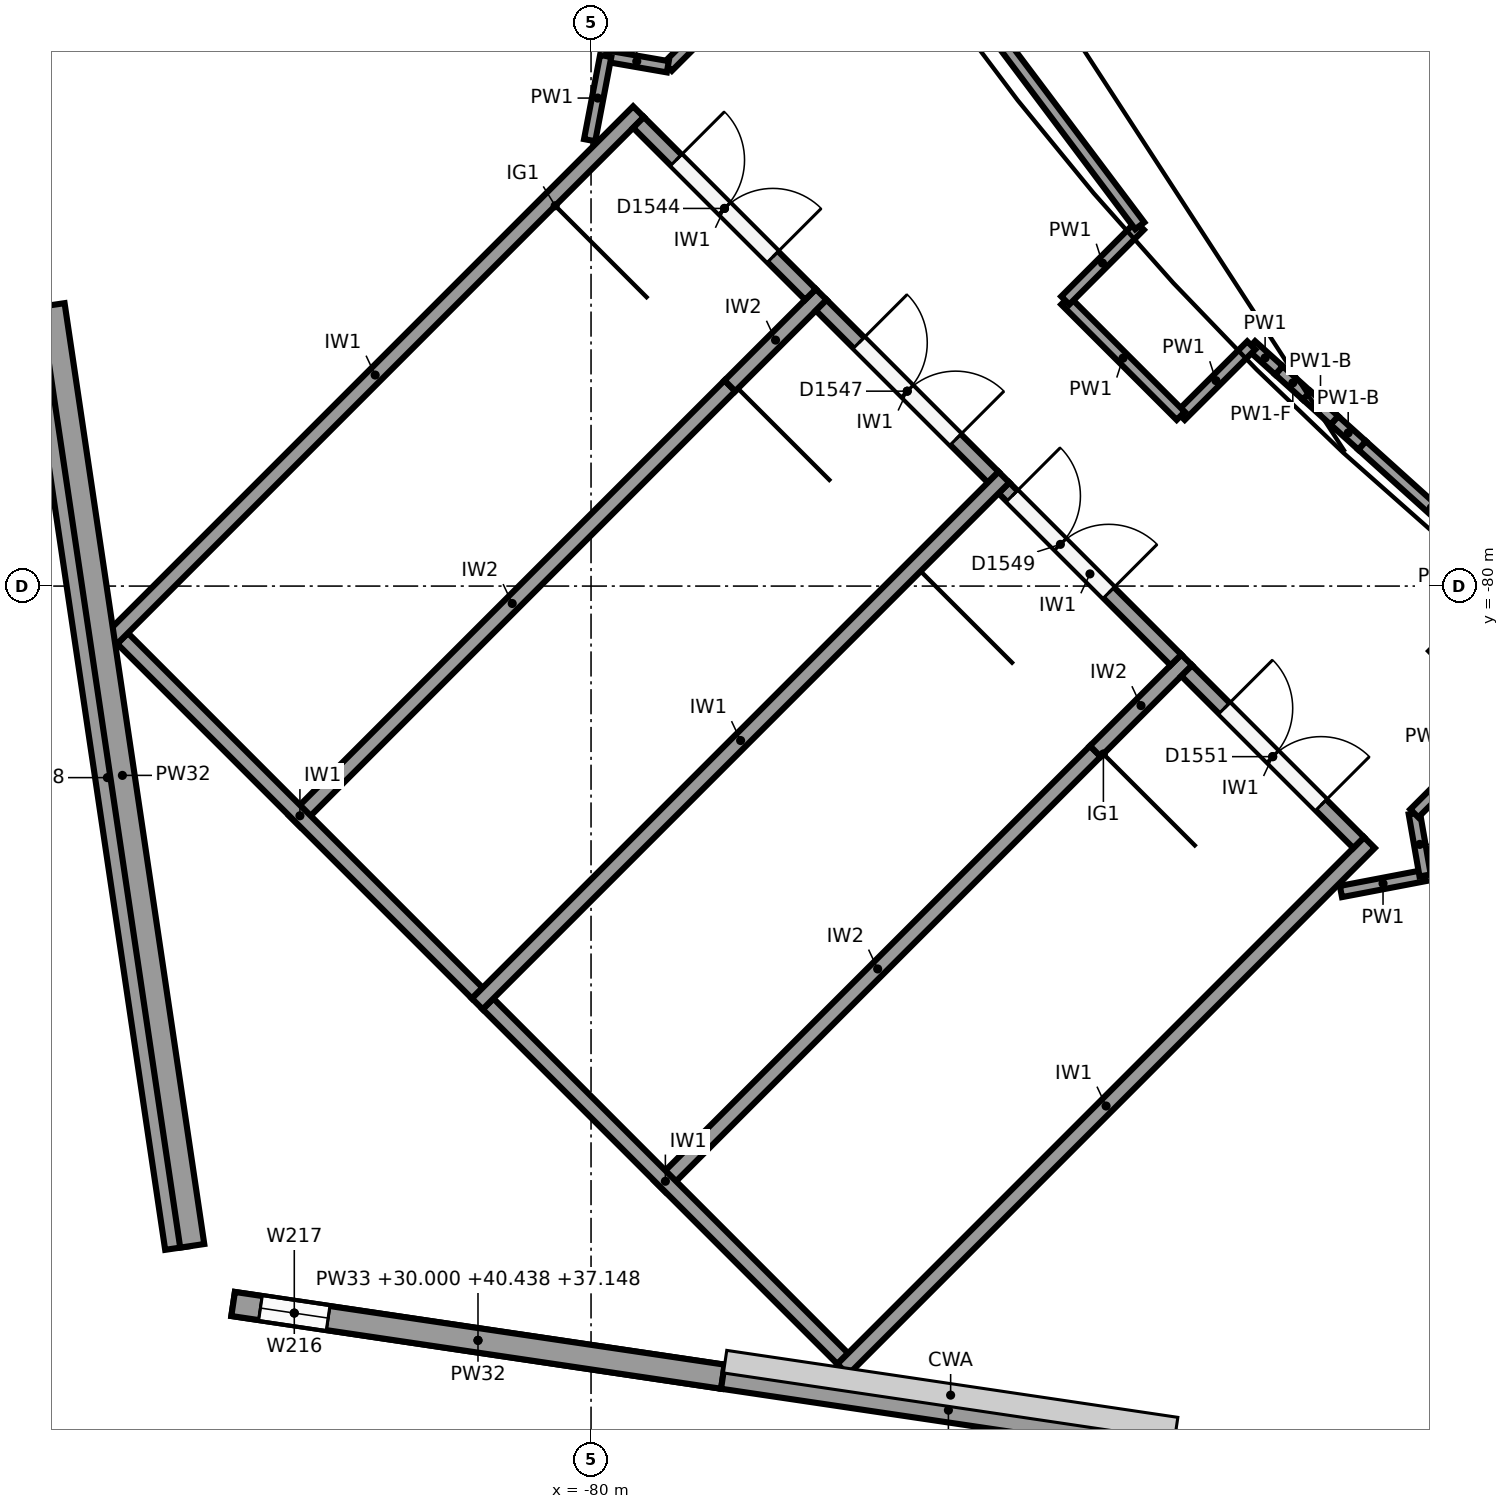
"""IFC4 building model, lengths in metres.
Left out: names, types, materials, properties, quantities, classifications, styles, units other than length and angle.
Written with IfcOpenShell. Run it as: python <this file> out.ifc"""

import sys

from ifc_helpers import new_model, si_unit, direction, frame, frame_2d, origin, origin_2d, place, context, subcontext, project, spatial, polyline, rectangle, circle, outline, extrude, element, fill, save


model = new_model("IFC4")
c1 = context("Model", 3, precision=1e-05, world=origin(), true_north=direction((0.0, 1.0)))
c2 = subcontext(c1, "Body", "Model", "MODEL_VIEW")
j1 = project(units=[si_unit("LENGTHUNIT", "METRE"), si_unit("PLANEANGLEUNIT", "RADIAN")], contexts=[c1])
p1 = place(None, origin())
s1 = spatial("IfcSite", under=j1, at=p1, CompositionType="ELEMENT")
p2 = place(p1, origin())
s2 = spatial("IfcBuilding", under=s1, at=p2, CompositionType="ELEMENT")
p3 = place(p2, frame((0.0, 0.0, 24.0)))
s3 = spatial("IfcBuildingStorey", under=s2, at=p3, CompositionType="ELEMENT", Elevation=24.0)
p4 = place(p3, frame((-87.151, -75.857, 0.0), z_axis=(0.0, 0.0, 1.0), x_axis=(1.0, 0.0, 0.0)))
e1 = element("IfcColumn", 1, at=p4, inside=s3, PredefinedType="COLUMN", context=c2, shape_type="SweptSolid", body=[
    extrude(circle(Radius=0.45, at=origin_2d()), origin(), (0.0, 0.0, 1.0), 6.0),
])
p5 = place(p3, frame((-71.775, -79.889, 0.0), z_axis=(0.0, 0.0, 1.0), x_axis=(1.0, 0.0, 0.0)))
e2 = element("IfcColumn", 2, at=p5, inside=s3, PredefinedType="COLUMN", context=c2, shape_type="SweptSolid", body=[
    extrude(circle(Radius=0.6, at=origin_2d()), origin(), (0.0, 0.0, 1.0), 6.0),
])
p6 = place(p3, frame((-85.174, -89.174, 0.0), z_axis=(0.0, 0.0, 1.0), x_axis=(1.0, 0.0, 0.0)))
e3 = element("IfcColumn", 3, at=p6, inside=s3, PredefinedType="COLUMN", context=c2, shape_type="SweptSolid", body=[
    extrude(circle(Radius=0.5, at=origin_2d()), origin(), (0.0, 0.0, 1.0), 6.0),
])
p7 = place(p3, frame((-71.857, -91.151, 0.0), z_axis=(0.0, 0.0, 1.0), x_axis=(1.0, 0.0, 0.0)))
e4 = element("IfcColumn", 4, at=p7, inside=s3, PredefinedType="COLUMN", context=c2, shape_type="SweptSolid", body=[
    extrude(circle(Radius=0.45, at=origin_2d()), origin(), (0.0, 0.0, 1.0), 6.0),
])
p8 = place(p3, frame((-85.247, -88.68, 0.0), z_axis=(0.0, 0.0, 1.0), x_axis=(-0.14684632149, 0.989159318747, 0.0)))
e5 = element("IfcWall", 5, at=p8, inside=s3, PredefinedType="SOLIDWALL", context=c2, shape_type="SweptSolid", body=[
    extrude(rectangle(XDim=12.514, YDim=0.32, at=frame_2d((6.257, 0.0))), origin(), (0.0, 0.0, 1.0), 6.0),
])
p9 = place(p3, frame((-85.445, -88.709, 6.0), z_axis=(0.0, 0.0, 1.0), x_axis=(-0.146868244204, 0.989156063948, 0.0)))
e6 = element("IfcWall", 6, at=p9, inside=s3, PredefinedType="SOLIDWALL", context=c2, shape_type="SweptSolid", body=[
    extrude(outline(polyline([(0.0, 0.0), (12.514, 0.0), (12.514, 4.117), (0.0, 10.438), (0.0, 0.0)])), frame((0.0, 0.16, 0.0), z_axis=(0.0, -1.0, 0.0), x_axis=(1.0, 0.0, 0.0)), (0.0, 0.0, 1.0), 0.32),
])
p10 = place(p3, frame((-78.266, -90.402, 0.0), z_axis=(0.0, 0.0, 1.0), x_axis=(-0.989154104726, 0.146881438937, 0.0)))
e7 = element("IfcWall", 7, at=p10, inside=s3, PredefinedType="SOLIDWALL", context=c2, shape_type="SweptSolid", body=[
    extrude(rectangle(XDim=6.514, YDim=0.32, at=frame_2d((3.257, 0.0))), origin(), (0.0, 0.0, 1.0), 6.0),
])
p11 = place(p10, frame((5.25, 0.0, 1.0)))
e8 = element("IfcOpeningElement", 8, at=p11, cuts=e7, PredefinedType="OPENING", context=c2, shape_type="SweptSolid", body=[
    extrude(rectangle(XDim=0.9, YDim=3.25, at=frame_2d((0.45, 1.625))), frame((0.0, 0.17, 0.0), z_axis=(0.0, -1.0, 0.0), x_axis=(1.0, 0.0, 0.0)), (0.0, 0.0, 1.0), 0.34),
])
p12 = place(p3, frame((-78.266, -90.402, 6.0), z_axis=(0.0, 0.0, 1.0), x_axis=(-0.989154104726, 0.146881438937, 0.0)))
e9 = element("IfcWall", 9, at=p12, inside=s3, PredefinedType="SOLIDWALL", context=c2, shape_type="SweptSolid", body=[
    extrude(outline(polyline([(0.0, 0.0), (6.514, 0.0), (6.514, 10.438), (0.0, 7.147), (0.0, 0.0)])), frame((0.0, 0.16, 0.0), z_axis=(0.0, -1.0, 0.0), x_axis=(1.0, 0.0, 0.0)), (0.0, 0.0, 1.0), 0.32),
])
p13 = place(p12, frame((5.25, 0.0, 1.6)))
e10 = element("IfcOpeningElement", 10, at=p13, cuts=e9, PredefinedType="OPENING", context=c2, shape_type="SweptSolid", body=[
    extrude(rectangle(XDim=0.9, YDim=3.0, at=frame_2d((0.45, 1.5))), frame((0.0, 0.17, 0.0), z_axis=(0.0, -1.0, 0.0), x_axis=(1.0, 0.0, 0.0)), (0.0, 0.0, 1.0), 0.34),
])
p14 = place(p3, frame((-72.331, -91.283, 5.65), z_axis=(0.0, 0.0, 1.0), x_axis=(-0.989158190862, 0.146853918747, 0.0)))
e11 = element("IfcWall", 11, at=p14, inside=s3, PredefinedType="SOLIDWALL", context=c2, shape_type="SweptSolid", body=[
    extrude(outline(polyline([(0.0, 0.0), (6.0, 0.0), (6.0, 7.498), (0.0, 4.467), (0.0, 0.0)])), frame((0.0, 0.16, 0.0), z_axis=(0.0, -1.0, 0.0), x_axis=(1.0, 0.0, 0.0)), (0.0, 0.0, 1.0), 0.32),
])
p15 = place(p3, frame((-91.137, -72.998, 0.0), z_axis=(0.0, 0.0, 1.0), x_axis=(0.943887243331, 0.330267878966, 0.0)))
e12 = element("IfcWall", 12, at=p15, inside=s3, PredefinedType="SHEAR", context=c2, shape_type="SweptSolid", body=[
    extrude(rectangle(XDim=8.3, YDim=0.2, at=frame_2d((4.15, 0.0))), origin(), (0.0, 0.0, 1.0), 5.75),
])
for number, where, z_axis, x_axis in (
    (13, (-86.305, -80.688, 0.0), (0.0, 0.0, 1.0), (0.707, 0.707, 0.0)),
    (14, (-81.497, -85.497, 0.0), (0.0, 0.0, 1.0), (0.707, 0.707, 0.0)),
    (15, (-76.688, -90.305, 0.0), (0.0, 0.0, 1.0), (0.707, 0.707, 0.0)),
):
    element("IfcWall", number, at=place(p3, frame(where, z_axis=z_axis, x_axis=x_axis)), inside=s3, PredefinedType="SHEAR", context=c2, shape_type="SweptSolid", body=[
        extrude(rectangle(XDim=9.8, YDim=0.2, at=frame_2d((4.9, 0.0))), origin(), (0.0, 0.0, 1.0), 5.75),
    ])
for number, where, z_axis, x_axis in (
    (16, (-86.164, -80.688, 0.0), (0.0, 0.0, 1.0), (0.707, -0.707, 0.0)),
    (17, (-81.355, -85.497, 0.0), (0.0, 0.0, 1.0), (0.707, -0.707, 0.0)),
):
    element("IfcWall", number, at=place(p3, frame(where, z_axis=z_axis, x_axis=x_axis)), inside=s3, PredefinedType="SHEAR", context=c2, shape_type="SweptSolid", body=[
        extrude(rectangle(XDim=6.6, YDim=0.2, at=frame_2d((3.3, 0.0))), origin(), (0.0, 0.0, 1.0), 5.75),
    ])
p16 = place(p3, frame((-83.901, -83.093, 0.0), z_axis=(0.0, 0.0, 1.0), x_axis=(0.707106781187, 0.707106781187, 0.0)))
e18 = element("IfcWall", 18, at=p16, inside=s3, PredefinedType="SHEAR", context=c2, shape_type="SweptSolid", body=[
    extrude(rectangle(XDim=8.1, YDim=0.2, at=frame_2d((4.05, 0.0))), origin(), (0.0, 0.0, 1.0), 5.75),
])
p17 = place(p3, frame((-78.173, -77.365, 0.0), z_axis=(0.0, 0.0, 1.0), x_axis=(0.707178586901, 0.707034968179, 0.0)))
e19 = element("IfcWall", 19, at=p17, inside=s3, PredefinedType="SHEAR", context=c2, shape_type="SweptSolid", body=[
    extrude(rectangle(XDim=1.7, YDim=0.2, at=frame_2d((0.85, 0.0))), origin(), (0.0, 0.0, 1.0), 5.75),
])
p18 = place(p3, frame((-79.093, -87.901, 0.0), z_axis=(0.0, 0.0, 1.0), x_axis=(0.707106781187, 0.707106781187, 0.0)))
e20 = element("IfcWall", 20, at=p18, inside=s3, PredefinedType="SHEAR", context=c2, shape_type="SweptSolid", body=[
    extrude(rectangle(XDim=8.1, YDim=0.2, at=frame_2d((4.05, 0.0))), origin(), (0.0, 0.0, 1.0), 5.75),
])
p19 = place(p3, frame((-73.365, -82.173, 0.0), z_axis=(0.0, 0.0, 1.0), x_axis=(0.707034968179, 0.707178586901, 0.0)))
e21 = element("IfcWall", 21, at=p19, inside=s3, PredefinedType="SHEAR", context=c2, shape_type="SweptSolid", body=[
    extrude(rectangle(XDim=1.7, YDim=0.2, at=frame_2d((0.85, 0.0))), origin(), (0.0, 0.0, 1.0), 5.75),
])
p20 = place(p3, frame((-79.375, -73.9, 0.0), z_axis=(0.0, 0.0, 1.0), x_axis=(0.707068634461, -0.707144925854, 0.0)))
e22 = element("IfcWall", 22, at=p20, inside=s3, PredefinedType="SHEAR", context=c2, shape_type="SweptSolid", body=[
    extrude(rectangle(XDim=3.2, YDim=0.2, at=frame_2d((1.6, 0.0))), origin(), (0.0, 0.0, 1.0), 5.75),
])
p21 = place(p20, frame((0.7, 0.0, 0.0)))
e23 = element("IfcOpeningElement", 23, at=p21, cuts=e22, PredefinedType="OPENING", context=c2, shape_type="SweptSolid", body=[
    extrude(rectangle(XDim=1.8, YDim=2.1, at=frame_2d((0.9, 1.05))), frame((0.0, 0.11, 0.0), z_axis=(0.0, -1.0, 0.0), x_axis=(1.0, 0.0, 0.0)), (0.0, 0.0, 1.0), 0.22),
])
p22 = place(p3, frame((-76.971, -76.304, 0.0), z_axis=(0.0, 0.0, 1.0), x_axis=(0.707106781187, -0.707106781187, 0.0)))
e24 = element("IfcWall", 24, at=p22, inside=s3, PredefinedType="SHEAR", context=c2, shape_type="SweptSolid", body=[
    extrude(rectangle(XDim=3.2, YDim=0.2, at=frame_2d((1.6, 0.0))), origin(), (0.0, 0.0, 1.0), 5.75),
])
p23 = place(p22, frame((0.7, 0.0, 0.0)))
e25 = element("IfcOpeningElement", 25, at=p23, cuts=e24, PredefinedType="OPENING", context=c2, shape_type="SweptSolid", body=[
    extrude(rectangle(XDim=1.8, YDim=2.1, at=frame_2d((0.9, 1.05))), frame((0.0, 0.11, 0.0), z_axis=(0.0, -1.0, 0.0), x_axis=(1.0, 0.0, 0.0)), (0.0, 0.0, 1.0), 0.22),
])
p24 = place(p3, frame((-74.567, -78.708, 0.0), z_axis=(0.0, 0.0, 1.0), x_axis=(0.707106781187, -0.707106781187, 0.0)))
e26 = element("IfcWall", 26, at=p24, inside=s3, PredefinedType="SHEAR", context=c2, shape_type="SweptSolid", body=[
    extrude(rectangle(XDim=3.2, YDim=0.2, at=frame_2d((1.6, 0.0))), origin(), (0.0, 0.0, 1.0), 5.75),
])
p25 = place(p24, frame((0.15, 0.0, 0.0)))
e27 = element("IfcOpeningElement", 27, at=p25, cuts=e26, PredefinedType="OPENING", context=c2, shape_type="SweptSolid", body=[
    extrude(rectangle(XDim=1.8, YDim=2.1, at=frame_2d((0.9, 1.05))), frame((0.0, 0.11, 0.0), z_axis=(0.0, -1.0, 0.0), x_axis=(1.0, 0.0, 0.0)), (0.0, 0.0, 1.0), 0.22),
])
p26 = place(p3, frame((-72.163, -81.113, 0.0), z_axis=(0.0, 0.0, 1.0), x_axis=(0.707144925854, -0.707068634461, 0.0)))
e28 = element("IfcWall", 28, at=p26, inside=s3, PredefinedType="SHEAR", context=c2, shape_type="SweptSolid", body=[
    extrude(rectangle(XDim=3.2, YDim=0.2, at=frame_2d((1.6, 0.0))), origin(), (0.0, 0.0, 1.0), 5.75),
])
p27 = place(p26, frame((0.7, 0.0, 0.0)))
e29 = element("IfcOpeningElement", 29, at=p27, cuts=e28, PredefinedType="OPENING", context=c2, shape_type="SweptSolid", body=[
    extrude(rectangle(XDim=1.8, YDim=2.1, at=frame_2d((0.9, 1.05))), frame((0.0, 0.11, 0.0), z_axis=(0.0, -1.0, 0.0), x_axis=(1.0, 0.0, 0.0)), (0.0, 0.0, 1.0), 0.22),
])
p28 = place(p3, frame((-68.998, -95.137, 0.0), z_axis=(0.0, 0.0, 1.0), x_axis=(0.330263153216, 0.943888896866, 0.0)))
e30 = element("IfcWall", 30, at=p28, inside=s3, PredefinedType="SHEAR", context=c2, shape_type="SweptSolid", body=[
    extrude(rectangle(XDim=8.1, YDim=0.2, at=frame_2d((4.05, 0.0))), origin(), (0.0, 0.0, 1.0), 5.75),
])
p29 = place(p3, frame((-70.134, -84.018, 0.0), z_axis=(0.0, 0.0, 1.0), x_axis=(0.982266484486, 0.187490142289, 0.0)))
e31 = element("IfcWall", 31, at=p29, inside=s3, PredefinedType="PARTITIONING", context=c2, shape_type="SweptSolid", body=[
    extrude(rectangle(XDim=1.128, YDim=0.15, at=frame_2d((0.564, 0.0))), origin(), (0.0, 0.0, 1.0), 5.4),
])
p30 = place(p3, frame((-69.026, -83.807, 0.0), z_axis=(0.0, 0.0, 1.0), x_axis=(-0.171316329805, 0.985216075357, 0.0)))
e32 = element("IfcWall", 32, at=p30, inside=s3, PredefinedType="PARTITIONING", context=c2, shape_type="SweptSolid", body=[
    extrude(rectangle(XDim=0.829, YDim=0.15, at=frame_2d((0.415, 0.0))), origin(), (0.0, 0.0, 1.0), 5.4),
])
p31 = place(p3, frame((-69.168, -82.99, 0.0), z_axis=(0.0, 0.0, 1.0), x_axis=(0.707106781187, 0.707106781187, 0.0)))
e33 = element("IfcWall", 33, at=p31, inside=s3, PredefinedType="PARTITIONING", context=c2, shape_type="SweptSolid", body=[
    extrude(rectangle(XDim=1.643, YDim=0.15, at=frame_2d((0.822, 0.0))), origin(), (0.0, 0.0, 1.0), 5.4),
])
p32 = place(p3, frame((-68.034, -79.792, 0.0), z_axis=(0.0, 0.0, 1.0), x_axis=(-0.742586219179, 0.669750481213, 0.0)))
e34 = element("IfcWall", 34, at=p32, inside=s3, PredefinedType="PARTITIONING", context=c2, shape_type="SweptSolid", body=[
    extrude(rectangle(XDim=2.454, YDim=0.15, at=frame_2d((1.227, 0.0))), origin(), (0.0, 0.0, 1.0), 5.4),
])
p33 = place(p3, frame((-69.856, -78.149, 0.0), z_axis=(0.0, 0.0, 1.0), x_axis=(-0.742477572111, 0.669870924068, 0.0)))
e35 = element("IfcWall", 35, at=p33, inside=s3, PredefinedType="PARTITIONING", context=c2, shape_type="SweptSolid", body=[
    extrude(rectangle(XDim=0.491, YDim=0.15, at=frame_2d((0.246, 0.0))), origin(), (0.0, 0.0, 1.0), 2.379),
])
p34 = place(p3, frame((-70.22, -77.82, 0.0), z_axis=(0.0, 0.0, 1.0), x_axis=(-0.742724945946, 0.669596635796, 0.0)))
e36 = element("IfcWall", 36, at=p34, inside=s3, PredefinedType="PARTITIONING", context=c2, shape_type="SweptSolid", body=[
    extrude(rectangle(XDim=0.491, YDim=0.15, at=frame_2d((0.245, 0.0))), origin(), (0.0, 0.0, 1.0), 2.379),
])
p35 = place(p3, frame((-70.585, -77.491, 0.0), z_axis=(0.0, 0.0, 1.0), x_axis=(-0.742254293896, 0.670118320293, 0.0)))
e37 = element("IfcWall", 37, at=p35, inside=s3, PredefinedType="PARTITIONING", context=c2, shape_type="SweptSolid", body=[
    extrude(rectangle(XDim=0.491, YDim=0.15, at=frame_2d((0.245, 0.0))), origin(), (0.0, 0.0, 1.0), 2.474),
])
p36 = place(p3, frame((-70.949, -77.162, 0.0), z_axis=(0.0, 0.0, 1.0), x_axis=(-0.742724945946, 0.669596635796, 0.0)))
e38 = element("IfcWall", 38, at=p36, inside=s3, PredefinedType="PARTITIONING", context=c2, shape_type="SweptSolid", body=[
    extrude(rectangle(XDim=0.491, YDim=0.15, at=frame_2d((0.245, 0.0))), origin(), (0.0, 0.0, 1.0), 5.4),
])
p37 = place(p3, frame((-71.313, -76.834, 0.0), z_axis=(0.0, 0.0, 1.0), x_axis=(-0.707664949678, -0.706548171746, 0.0)))
e39 = element("IfcWall", 39, at=p37, inside=s3, PredefinedType="PARTITIONING", context=c2, shape_type="SweptSolid", body=[
    extrude(rectangle(XDim=1.312, YDim=0.15, at=frame_2d((0.656, 0.0))), origin(), (0.0, 0.0, 1.0), 5.4),
])
p38 = place(p3, frame((-72.242, -77.76, 0.0), z_axis=(0.0, 0.0, 1.0), x_axis=(-0.707163624852, 0.707049932951, 0.0)))
e40 = element("IfcWall", 40, at=p38, inside=s3, PredefinedType="PARTITIONING", context=c2, shape_type="SweptSolid", body=[
    extrude(rectangle(XDim=2.147, YDim=0.15, at=frame_2d((1.074, 0.0))), origin(), (0.0, 0.0, 1.0), 5.4),
])
p39 = place(p3, frame((-73.76, -76.242, 0.0), z_axis=(0.0, 0.0, 1.0), x_axis=(0.706226529773, 0.707985938168, 0.0)))
e41 = element("IfcWall", 41, at=p39, inside=s3, PredefinedType="PARTITIONING", context=c2, shape_type="SweptSolid", body=[
    extrude(rectangle(XDim=1.388, YDim=0.15, at=frame_2d((0.694, 0.0))), origin(), (0.0, 0.0, 1.0), 5.4),
])
p40 = place(p3, frame((-72.78, -75.26, 0.0), z_axis=(0.0, 0.0, 1.0), x_axis=(-0.600540118693, 0.799594625945, 0.0)))
e42 = element("IfcWall", 42, at=p40, inside=s3, PredefinedType="PARTITIONING", context=c2, shape_type="SweptSolid", body=[
    extrude(rectangle(XDim=5.929, YDim=0.15, at=frame_2d((2.964, 0.0))), origin(), (0.0, 0.0, 1.0), 5.4),
])
p41 = place(p3, frame((-78.091, -72.269, 0.0), z_axis=(0.0, 0.0, 1.0), x_axis=(-0.707106781187, -0.707106781187, 0.0)))
e43 = element("IfcWall", 43, at=p41, inside=s3, PredefinedType="PARTITIONING", context=c2, shape_type="SweptSolid", body=[
    extrude(rectangle(XDim=1.272, YDim=0.15, at=frame_2d((0.636, 0.0))), origin(), (0.0, 0.0, 1.0), 5.4),
])
p42 = place(p3, frame((-78.99, -73.168, 0.0), z_axis=(0.0, 0.0, 1.0), x_axis=(-0.985216075357, 0.171316329805, 0.0)))
e44 = element("IfcWall", 44, at=p42, inside=s3, PredefinedType="PARTITIONING", context=c2, shape_type="SweptSolid", body=[
    extrude(rectangle(XDim=0.829, YDim=0.15, at=frame_2d((0.415, 0.0))), origin(), (0.0, 0.0, 1.0), 5.4),
])
p43 = place(p3, frame((-79.807, -73.026, 0.0), z_axis=(0.0, 0.0, 1.0), x_axis=(-0.187490142289, -0.982266484486, 0.0)))
e45 = element("IfcWall", 45, at=p43, inside=s3, PredefinedType="PARTITIONING", context=c2, shape_type="SweptSolid", body=[
    extrude(rectangle(XDim=1.128, YDim=0.15, at=frame_2d((0.564, 0.0))), origin(), (0.0, 0.0, 1.0), 5.4),
])
p44 = place(p11, origin())
e46 = element("IfcWindow", 46, at=p44, inside=s3, PartitioningType="SINGLE_PANEL", PredefinedType="WINDOW", context=c2, shape_type="SweptSolid", body=[
    extrude(rectangle(XDim=0.9, YDim=3.25, at=frame_2d((0.45, 1.625))), frame((0.0, 0.03, 0.0), z_axis=(0.0, -1.0, 0.0), x_axis=(1.0, 0.0, 0.0)), (0.0, 0.0, 1.0), 0.06),
])
fill(e8, e46)
p45 = place(p13, origin())
e47 = element("IfcWindow", 47, at=p45, inside=s3, PartitioningType="SINGLE_PANEL", PredefinedType="WINDOW", context=c2, shape_type="SweptSolid", body=[
    extrude(rectangle(XDim=0.9, YDim=3.0, at=frame_2d((0.45, 1.5))), frame((0.0, 0.03, 0.0), z_axis=(0.0, -1.0, 0.0), x_axis=(1.0, 0.0, 0.0)), (0.0, 0.0, 1.0), 0.06),
])
fill(e10, e47)
p46 = place(p21, origin())
e48 = element("IfcDoor", 48, at=p46, inside=s3, OperationType="DOUBLE_DOOR_SINGLE_SWING", PredefinedType="DOOR", context=c2, shape_type="SweptSolid", body=[
    extrude(rectangle(XDim=1.8, YDim=2.1, at=frame_2d((0.9, 1.05))), frame((0.0, 0.025, 0.0), z_axis=(0.0, -1.0, 0.0), x_axis=(1.0, 0.0, 0.0)), (0.0, 0.0, 1.0), 0.05),
])
fill(e23, e48)
p47 = place(p23, origin())
e49 = element("IfcDoor", 49, at=p47, inside=s3, OperationType="DOUBLE_DOOR_SINGLE_SWING", PredefinedType="DOOR", context=c2, shape_type="SweptSolid", body=[
    extrude(rectangle(XDim=1.8, YDim=2.1, at=frame_2d((0.9, 1.05))), frame((0.0, 0.025, 0.0), z_axis=(0.0, -1.0, 0.0), x_axis=(1.0, 0.0, 0.0)), (0.0, 0.0, 1.0), 0.05),
])
fill(e25, e49)
p48 = place(p25, origin())
e50 = element("IfcDoor", 50, at=p48, inside=s3, OperationType="DOUBLE_DOOR_SINGLE_SWING", PredefinedType="DOOR", context=c2, shape_type="SweptSolid", body=[
    extrude(rectangle(XDim=1.8, YDim=2.1, at=frame_2d((0.9, 1.05))), frame((0.0, 0.025, 0.0), z_axis=(0.0, -1.0, 0.0), x_axis=(1.0, 0.0, 0.0)), (0.0, 0.0, 1.0), 0.05),
])
fill(e27, e50)
p49 = place(p27, origin())
e51 = element("IfcDoor", 51, at=p49, inside=s3, OperationType="DOUBLE_DOOR_SINGLE_SWING", PredefinedType="DOOR", context=c2, shape_type="SweptSolid", body=[
    extrude(rectangle(XDim=1.8, YDim=2.1, at=frame_2d((0.9, 1.05))), frame((0.0, 0.025, 0.0), z_axis=(0.0, -1.0, 0.0), x_axis=(1.0, 0.0, 0.0)), (0.0, 0.0, 1.0), 0.05),
])
fill(e29, e51)
save(model, sys.argv[1])
